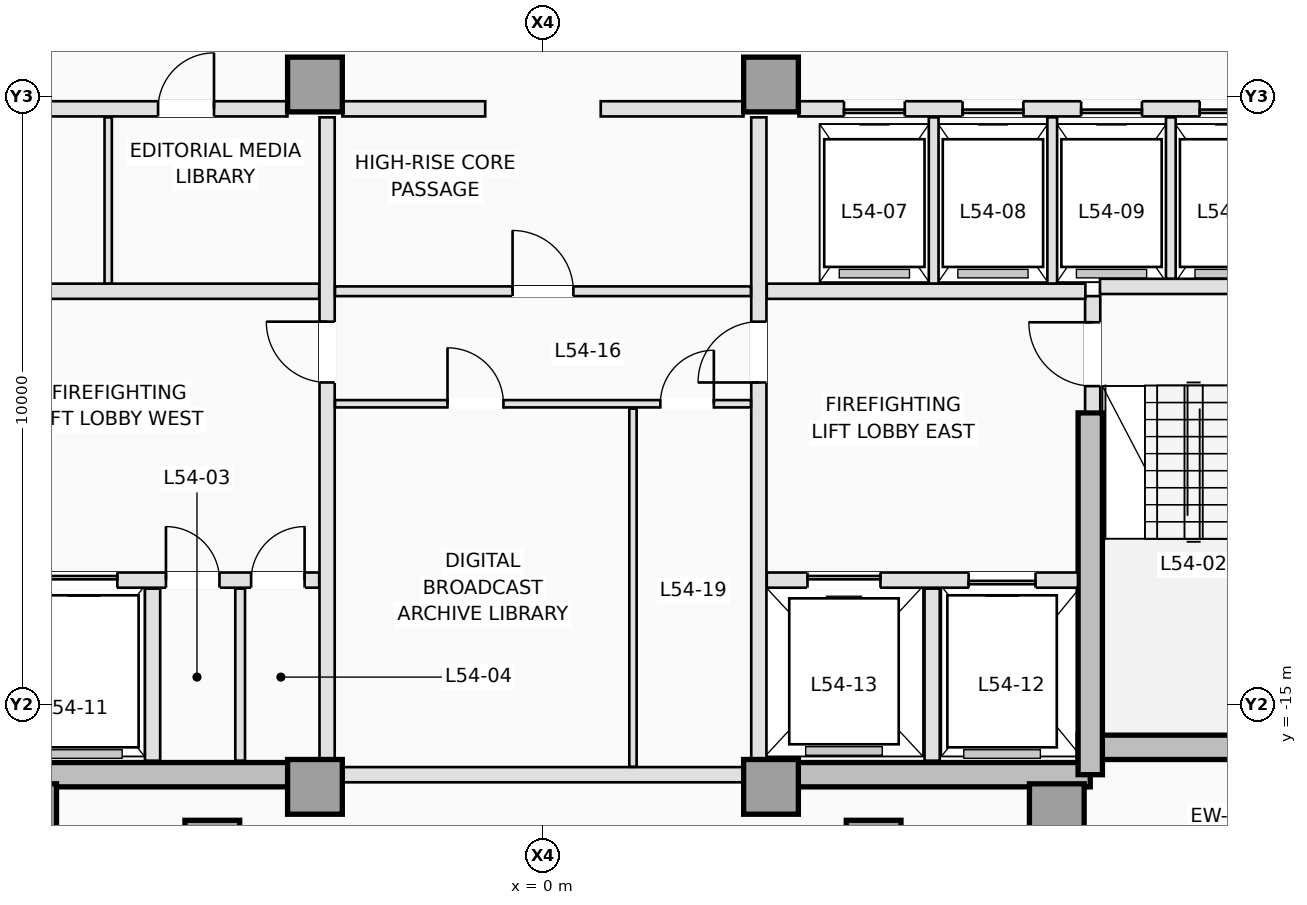
"""IFC4 building model, lengths in metres.
Left out: names, types, materials, properties, quantities, classifications, styles, units other than length and angle.
Written with IfcOpenShell. Run it as: python <this file> out.ifc"""

import sys

from ifc_helpers import new_model, si_unit, direction, frame, frame_2d, origin, origin_2d, place, context, subcontext, project, spatial, rectangle, extrude, element, fill, save


model = new_model("IFC4")
c1 = context("Model", 3, precision=1e-05, world=origin(), true_north=direction((0.0, 1.0)))
c2 = subcontext(c1, "Body", "Model", "MODEL_VIEW")
j1 = project(units=[si_unit("LENGTHUNIT", "METRE"), si_unit("PLANEANGLEUNIT", "RADIAN")], contexts=[c1])
p1 = place(None, origin())
s1 = spatial("IfcSite", under=j1, at=p1, CompositionType="ELEMENT")
p2 = place(p1, origin())
s2 = spatial("IfcBuilding", under=s1, at=p2, CompositionType="ELEMENT")
p3 = place(p2, frame((0.0, 0.0, 197.4)))
s3 = spatial("IfcBuildingStorey", under=s2, at=p3, CompositionType="ELEMENT", Elevation=197.4)
for number, where, z_axis, x_axis in (
    (1, (-9.0, -16.15, 0.0), (0.0, 0.0, 1.0), (1.0, 0.0, 0.0)),
    (2, (3.75, -16.15, 0.0), (0.0, 0.0, 1.0), (1.0, 0.0, 0.0)),
):
    element("IfcWall", number, at=place(p3, frame(where, z_axis=z_axis, x_axis=x_axis)), inside=s3, PredefinedType="SHEAR", context=c2, shape_type="SweptSolid", body=[
        extrude(rectangle(XDim=5.25, YDim=0.4, at=frame_2d((2.625, 0.0))), origin(), (0.0, 0.0, 1.0), 3.5),
    ])
p4 = place(p3, frame((8.8, -15.7, 0.0), z_axis=(0.0, 0.0, 1.0), x_axis=(1.0, 0.0, 0.0)))
e3 = element("IfcWall", 3, at=p4, inside=s3, PredefinedType="SHEAR", context=c2, shape_type="SweptSolid", body=[
    extrude(rectangle(XDim=3.8, YDim=0.4, at=frame_2d((1.9, 0.0))), origin(), (0.0, 0.0, 1.0), 3.5),
])
p5 = place(p3, frame((9.0, -16.15, 0.0), z_axis=(0.0, 0.0, 1.0), x_axis=(0.0, 1.0, 0.0)))
e4 = element("IfcWall", 4, at=p5, inside=s3, PredefinedType="SHEAR", context=c2, shape_type="SweptSolid", body=[
    extrude(rectangle(XDim=5.95, YDim=0.4, at=frame_2d((2.975, 0.0))), origin(), (0.0, 0.0, 1.0), 3.5),
])
for number, where, z_axis, x_axis in (
    (5, (-8.45, -16.75, 0.0), (0.0, 0.0, 1.0), (1.0, 0.0, 0.0)),
    (6, (-3.75, -16.35, 0.0), (0.0, 0.0, 1.0), (1.0, 0.0, 0.0)),
    (7, (3.75, -16.35, 0.0), (0.0, 0.0, 1.0), (1.0, 0.0, 0.0)),
    (8, (8.45, -16.75, 0.0), (0.0, 0.0, 1.0), (1.0, 0.0, 0.0)),
    (9, (-3.75, -4.8, 0.0), (0.0, 0.0, 1.0), (1.0, 0.0, 0.0)),
    (10, (3.75, -4.8, 0.0), (0.0, 0.0, 1.0), (1.0, 0.0, 0.0)),
    (11, (-5.438, -17.35, 0.0), (0.0, 0.0, 1.0), (0.0, 1.0, 0.0)),
    (12, (5.438, -17.35, 0.0), (0.0, 0.0, 1.0), (0.0, 1.0, 0.0)),
):
    element("IfcColumn", number, at=place(p3, frame(where, z_axis=z_axis, x_axis=x_axis)), inside=s3, PredefinedType="COLUMN", context=c2, shape_type="SweptSolid", body=[
        extrude(rectangle(XDim=0.9, YDim=0.9, at=origin_2d()), origin(), (0.0, 0.0, 1.0), 3.5),
    ])
p6 = place(p3, frame((9.04, -10.18, 0.0), z_axis=(0.0, 0.0, 1.0), x_axis=(0.0, 1.0, 0.0)))
e13 = element("IfcWall", 13, at=p6, inside=s3, PredefinedType="PARTITIONING", context=c2, shape_type="SweptSolid", body=[
    extrude(rectangle(XDim=1.9, YDim=0.25, at=frame_2d((0.95, 0.0))), origin(), (0.0, 0.0, 1.0), 3.25),
])
p7 = place(p6, frame((0.42, 0.0, 0.0)))
e14 = element("IfcOpeningElement", 14, at=p7, cuts=e13, PredefinedType="OPENING", context=c2, shape_type="SweptSolid", body=[
    extrude(rectangle(XDim=1.05, YDim=2.15, at=frame_2d((0.525, 1.075))), frame((0.0, 0.135, 0.0), z_axis=(0.0, -1.0, 0.0), x_axis=(1.0, 0.0, 0.0)), (0.0, 0.0, 1.0), 0.27),
])
p8 = place(p3, frame((9.16, -8.12, 0.0), z_axis=(0.0, 0.0, 1.0), x_axis=(1.0, 0.0, 0.0)))
e15 = element("IfcWall", 15, at=p8, inside=s3, PredefinedType="PARTITIONING", context=c2, shape_type="SweptSolid", body=[
    extrude(rectangle(XDim=3.22, YDim=0.25, at=frame_2d((1.61, 0.0))), origin(), (0.0, 0.0, 1.0), 3.25),
])
p9 = place(p3, frame((-8.798, -12.95, 0.0), z_axis=(0.0, 0.0, 1.0), x_axis=(1.0, 0.0, 0.0)))
e16 = element("IfcWall", 16, at=p9, inside=s3, PredefinedType="PARTITIONING", context=c2, shape_type="SweptSolid", body=[
    extrude(rectangle(XDim=5.118, YDim=0.25, at=frame_2d((2.559, 0.0))), origin(), (0.0, 0.0, 1.0), 3.25),
])
p10 = place(p9, frame((0.698, 0.0, 0.0)))
e17 = element("IfcOpeningElement", 17, at=p10, cuts=e16, PredefinedType="OPENING", context=c2, shape_type="SweptSolid", body=[
    extrude(rectangle(XDim=1.1, YDim=2.15, at=frame_2d((0.55, 1.075))), frame((0.0, 0.135, 0.0), z_axis=(0.0, -1.0, 0.0), x_axis=(1.0, 0.0, 0.0)), (0.0, 0.0, 1.0), 0.27),
])
p11 = place(p9, frame((2.598, 0.0, 0.0)))
e18 = element("IfcOpeningElement", 18, at=p11, cuts=e16, PredefinedType="OPENING", context=c2, shape_type="SweptSolid", body=[
    extrude(rectangle(XDim=0.88, YDim=2.1, at=frame_2d((0.44, 1.05))), frame((0.0, 0.135, 0.0), z_axis=(0.0, -1.0, 0.0), x_axis=(1.0, 0.0, 0.0)), (0.0, 0.0, 1.0), 0.27),
])
p12 = place(p9, frame((3.998, 0.0, 0.0)))
e19 = element("IfcOpeningElement", 19, at=p12, cuts=e16, PredefinedType="OPENING", context=c2, shape_type="SweptSolid", body=[
    extrude(rectangle(XDim=0.88, YDim=2.1, at=frame_2d((0.44, 1.05))), frame((0.0, 0.135, 0.0), z_axis=(0.0, -1.0, 0.0), x_axis=(1.0, 0.0, 0.0)), (0.0, 0.0, 1.0), 0.27),
])
p13 = place(p3, frame((3.68, -12.95, 0.0), z_axis=(0.0, 0.0, 1.0), x_axis=(1.0, 0.0, 0.0)))
e20 = element("IfcWall", 20, at=p13, inside=s3, PredefinedType="PARTITIONING", context=c2, shape_type="SweptSolid", body=[
    extrude(rectangle(XDim=5.118, YDim=0.25, at=frame_2d((2.559, 0.0))), origin(), (0.0, 0.0, 1.0), 3.25),
])
p14 = place(p13, frame((3.32, 0.0, 0.0)))
e21 = element("IfcOpeningElement", 21, at=p14, cuts=e20, PredefinedType="OPENING", context=c2, shape_type="SweptSolid", body=[
    extrude(rectangle(XDim=1.1, YDim=2.15, at=frame_2d((0.55, 1.075))), frame((0.0, 0.135, 0.0), z_axis=(0.0, -1.0, 0.0), x_axis=(1.0, 0.0, 0.0)), (0.0, 0.0, 1.0), 0.27),
])
p15 = place(p13, frame((0.67, 0.0, 0.0)))
e22 = element("IfcOpeningElement", 22, at=p15, cuts=e20, PredefinedType="OPENING", context=c2, shape_type="SweptSolid", body=[
    extrude(rectangle(XDim=1.2, YDim=2.15, at=frame_2d((0.6, 1.075))), frame((0.0, 0.135, 0.0), z_axis=(0.0, -1.0, 0.0), x_axis=(1.0, 0.0, 0.0)), (0.0, 0.0, 1.0), 0.27),
])
p16 = place(p3, frame((-6.42, -15.92, 0.0), z_axis=(0.0, 0.0, 1.0), x_axis=(0.0, 1.0, 0.0)))
e23 = element("IfcWall", 23, at=p16, inside=s3, PredefinedType="PARTITIONING", context=c2, shape_type="SweptSolid", body=[
    extrude(rectangle(XDim=2.83, YDim=0.25, at=frame_2d((1.415, 0.0))), origin(), (0.0, 0.0, 1.0), 3.25),
])
p17 = place(p3, frame((-4.98, -15.92, 0.0), z_axis=(0.0, 0.0, 1.0), x_axis=(0.0, 1.0, 0.0)))
e24 = element("IfcWall", 24, at=p17, inside=s3, PredefinedType="PARTITIONING", context=c2, shape_type="SweptSolid", body=[
    extrude(rectangle(XDim=2.83, YDim=0.16, at=frame_2d((1.415, 0.0))), origin(), (0.0, 0.0, 1.0), 3.25),
])
p18 = place(p3, frame((6.4, -15.92, 0.0), z_axis=(0.0, 0.0, 1.0), x_axis=(0.0, 1.0, 0.0)))
e25 = element("IfcWall", 25, at=p18, inside=s3, PredefinedType="PARTITIONING", context=c2, shape_type="SweptSolid", body=[
    extrude(rectangle(XDim=2.83, YDim=0.25, at=frame_2d((1.415, 0.0))), origin(), (0.0, 0.0, 1.0), 3.25),
])
for number, where, z_axis, x_axis in (
    (26, (-8.92, -8.2, 0.0), (0.0, 0.0, 1.0), (1.0, 0.0, 0.0)),
    (27, (3.68, -8.2, 0.0), (0.0, 0.0, 1.0), (1.0, 0.0, 0.0)),
):
    element("IfcWall", number, at=place(p3, frame(where, z_axis=z_axis, x_axis=x_axis)), inside=s3, PredefinedType="PARTITIONING", context=c2, shape_type="SweptSolid", body=[
        extrude(rectangle(XDim=5.24, YDim=0.25, at=frame_2d((2.62, 0.0))), origin(), (0.0, 0.0, 1.0), 3.25),
    ])
p19 = place(p3, frame((-3.55, -15.898, 0.0), z_axis=(0.0, 0.0, 1.0), x_axis=(0.0, 1.0, 0.0)))
e28 = element("IfcWall", 28, at=p19, inside=s3, PredefinedType="PARTITIONING", context=c2, shape_type="SweptSolid", body=[
    extrude(rectangle(XDim=10.558, YDim=0.25, at=frame_2d((5.279, 0.0))), origin(), (0.0, 0.0, 1.0), 3.25),
])
p20 = place(p19, frame((6.198, 0.0, 0.0)))
e29 = element("IfcOpeningElement", 29, at=p20, cuts=e28, PredefinedType="OPENING", context=c2, shape_type="SweptSolid", body=[
    extrude(rectangle(XDim=1.0, YDim=2.15, at=frame_2d((0.5, 1.075))), frame((0.0, 0.135, 0.0), z_axis=(0.0, -1.0, 0.0), x_axis=(1.0, 0.0, 0.0)), (0.0, 0.0, 1.0), 0.27),
])
p21 = place(p3, frame((3.55, -15.898, 0.0), z_axis=(0.0, 0.0, 1.0), x_axis=(0.0, 1.0, 0.0)))
e30 = element("IfcWall", 30, at=p21, inside=s3, PredefinedType="PARTITIONING", context=c2, shape_type="SweptSolid", body=[
    extrude(rectangle(XDim=10.558, YDim=0.25, at=frame_2d((5.279, 0.0))), origin(), (0.0, 0.0, 1.0), 3.25),
])
p22 = place(p21, frame((6.198, 0.0, 0.0)))
e31 = element("IfcOpeningElement", 31, at=p22, cuts=e30, PredefinedType="OPENING", context=c2, shape_type="SweptSolid", body=[
    extrude(rectangle(XDim=1.0, YDim=2.15, at=frame_2d((0.5, 1.075))), frame((0.0, 0.135, 0.0), z_axis=(0.0, -1.0, 0.0), x_axis=(1.0, 0.0, 0.0)), (0.0, 0.0, 1.0), 0.27),
])
p23 = place(p3, frame((-12.48, -5.2, 0.0), z_axis=(0.0, 0.0, 1.0), x_axis=(1.0, 0.0, 0.0)))
e32 = element("IfcWall", 32, at=p23, inside=s3, PredefinedType="PARTITIONING", context=c2, shape_type="SweptSolid", body=[
    extrude(rectangle(XDim=8.278, YDim=0.25, at=frame_2d((4.139, 0.0))), origin(), (0.0, 0.0, 1.0), 3.25),
])
p24 = place(p23, frame((3.05, 0.0, 0.0)))
e33 = element("IfcOpeningElement", 33, at=p24, cuts=e32, PredefinedType="OPENING", context=c2, shape_type="SweptSolid", body=[
    extrude(rectangle(XDim=0.92, YDim=2.12, at=frame_2d((0.46, 1.06))), frame((0.0, 0.135, 0.0), z_axis=(0.0, -1.0, 0.0), x_axis=(1.0, 0.0, 0.0)), (0.0, 0.0, 1.0), 0.27),
])
p25 = place(p23, frame((6.15, 0.0, 0.0)))
e34 = element("IfcOpeningElement", 34, at=p25, cuts=e32, PredefinedType="OPENING", context=c2, shape_type="SweptSolid", body=[
    extrude(rectangle(XDim=0.92, YDim=2.12, at=frame_2d((0.46, 1.06))), frame((0.0, 0.135, 0.0), z_axis=(0.0, -1.0, 0.0), x_axis=(1.0, 0.0, 0.0)), (0.0, 0.0, 1.0), 0.27),
])
p26 = place(p3, frame((4.202, -5.2, 0.0), z_axis=(0.0, 0.0, 1.0), x_axis=(1.0, 0.0, 0.0)))
e35 = element("IfcWall", 35, at=p26, inside=s3, PredefinedType="PARTITIONING", context=c2, shape_type="SweptSolid", body=[
    extrude(rectangle(XDim=8.278, YDim=0.25, at=frame_2d((4.139, 0.0))), origin(), (0.0, 0.0, 1.0), 3.25),
])
p27 = place(p26, frame((0.748, 0.0, 0.0)))
e36 = element("IfcOpeningElement", 36, at=p27, cuts=e35, PredefinedType="OPENING", context=c2, shape_type="SweptSolid", body=[
    extrude(rectangle(XDim=1.0, YDim=2.15, at=frame_2d((0.5, 1.075))), frame((0.0, 0.135, 0.0), z_axis=(0.0, -1.0, 0.0), x_axis=(1.0, 0.0, 0.0)), (0.0, 0.0, 1.0), 0.27),
])
p28 = place(p26, frame((2.698, 0.0, 0.0)))
e37 = element("IfcOpeningElement", 37, at=p28, cuts=e35, PredefinedType="OPENING", context=c2, shape_type="SweptSolid", body=[
    extrude(rectangle(XDim=1.0, YDim=2.15, at=frame_2d((0.5, 1.075))), frame((0.0, 0.135, 0.0), z_axis=(0.0, -1.0, 0.0), x_axis=(1.0, 0.0, 0.0)), (0.0, 0.0, 1.0), 0.27),
])
p29 = place(p26, frame((4.648, 0.0, 0.0)))
e38 = element("IfcOpeningElement", 38, at=p29, cuts=e35, PredefinedType="OPENING", context=c2, shape_type="SweptSolid", body=[
    extrude(rectangle(XDim=1.0, YDim=2.15, at=frame_2d((0.5, 1.075))), frame((0.0, 0.135, 0.0), z_axis=(0.0, -1.0, 0.0), x_axis=(1.0, 0.0, 0.0)), (0.0, 0.0, 1.0), 0.27),
])
p30 = place(p26, frame((6.598, 0.0, 0.0)))
e39 = element("IfcOpeningElement", 39, at=p30, cuts=e35, PredefinedType="OPENING", context=c2, shape_type="SweptSolid", body=[
    extrude(rectangle(XDim=1.0, YDim=2.15, at=frame_2d((0.5, 1.075))), frame((0.0, 0.135, 0.0), z_axis=(0.0, -1.0, 0.0), x_axis=(1.0, 0.0, 0.0)), (0.0, 0.0, 1.0), 0.27),
])
for number, where, z_axis, x_axis in (
    (40, (-3.298, -5.2, 0.0), (0.0, 0.0, 1.0), (1.0, 0.0, 0.0)),
    (41, (0.95, -5.2, 0.0), (0.0, 0.0, 1.0), (1.0, 0.0, 0.0)),
):
    element("IfcWall", number, at=place(p3, frame(where, z_axis=z_axis, x_axis=x_axis)), inside=s3, PredefinedType="PARTITIONING", context=c2, shape_type="SweptSolid", body=[
        extrude(rectangle(XDim=2.348, YDim=0.25, at=frame_2d((1.174, 0.0))), origin(), (0.0, 0.0, 1.0), 3.25),
    ])
p31 = place(p3, frame((-7.15, -8.073, 0.0), z_axis=(0.0, 0.0, 1.0), x_axis=(0.0, 1.0, 0.0)))
e42 = element("IfcWall", 42, at=p31, inside=s3, PredefinedType="PARTITIONING", context=c2, shape_type="SweptSolid", body=[
    extrude(rectangle(XDim=2.733, YDim=0.12, at=frame_2d((1.366, 0.0))), origin(), (0.0, 0.0, 1.0), 3.25),
])
for number, where, z_axis, x_axis in (
    (43, (6.425, -8.073, 0.0), (0.0, 0.0, 1.0), (0.0, 1.0, 0.0)),
    (44, (8.375, -8.073, 0.0), (0.0, 0.0, 1.0), (0.0, 1.0, 0.0)),
):
    element("IfcWall", number, at=place(p3, frame(where, z_axis=z_axis, x_axis=x_axis)), inside=s3, PredefinedType="PARTITIONING", context=c2, shape_type="SweptSolid", body=[
        extrude(rectangle(XDim=2.733, YDim=0.16, at=frame_2d((1.366, 0.0))), origin(), (0.0, 0.0, 1.0), 3.25),
    ])
p32 = place(p3, frame((10.325, -7.993, 0.0), z_axis=(0.0, 0.0, 1.0), x_axis=(0.0, 1.0, 0.0)))
e45 = element("IfcWall", 45, at=p32, inside=s3, PredefinedType="PARTITIONING", context=c2, shape_type="SweptSolid", body=[
    extrude(rectangle(XDim=2.653, YDim=0.16, at=frame_2d((1.326, 0.0))), origin(), (0.0, 0.0, 1.0), 3.25),
])
p33 = place(p3, frame((-3.298, -16.15, 0.0), z_axis=(0.0, 0.0, 1.0), x_axis=(1.0, 0.0, 0.0)))
e46 = element("IfcWall", 46, at=p33, inside=s3, PredefinedType="PARTITIONING", context=c2, shape_type="SweptSolid", body=[
    extrude(rectangle(XDim=6.596, YDim=0.25, at=frame_2d((3.298, 0.0))), origin(), (0.0, 0.0, 1.0), 2.45),
])
p34 = place(p3, frame((-3.42, -8.2, 0.0), z_axis=(0.0, 0.0, 1.0), x_axis=(1.0, 0.0, 0.0)))
e47 = element("IfcWall", 47, at=p34, inside=s3, PredefinedType="PARTITIONING", context=c2, shape_type="SweptSolid", body=[
    extrude(rectangle(XDim=6.84, YDim=0.16, at=frame_2d((3.42, 0.0))), origin(), (0.0, 0.0, 1.0), 3.25),
])
p35 = place(p34, frame((2.92, 0.0, 0.0)))
e48 = element("IfcOpeningElement", 48, at=p35, cuts=e47, PredefinedType="OPENING", context=c2, shape_type="SweptSolid", body=[
    extrude(rectangle(XDim=1.0, YDim=2.15, at=frame_2d((0.5, 1.075))), frame((0.0, 0.09, 0.0), z_axis=(0.0, -1.0, 0.0), x_axis=(1.0, 0.0, 0.0)), (0.0, 0.0, 1.0), 0.18),
])
p36 = place(p3, frame((-3.42, -10.05, 0.0), z_axis=(0.0, 0.0, 1.0), x_axis=(1.0, 0.0, 0.0)))
e49 = element("IfcWall", 49, at=p36, inside=s3, PredefinedType="PARTITIONING", context=c2, shape_type="SweptSolid", body=[
    extrude(rectangle(XDim=6.84, YDim=0.12, at=frame_2d((3.42, 0.0))), origin(), (0.0, 0.0, 1.0), 3.25),
])
p37 = place(p36, frame((1.85, 0.0, 0.0)))
e50 = element("IfcOpeningElement", 50, at=p37, cuts=e49, PredefinedType="OPENING", context=c2, shape_type="SweptSolid", body=[
    extrude(rectangle(XDim=0.92, YDim=2.12, at=frame_2d((0.46, 1.06))), frame((0.0, 0.07, 0.0), z_axis=(0.0, -1.0, 0.0), x_axis=(1.0, 0.0, 0.0)), (0.0, 0.0, 1.0), 0.14),
])
p38 = place(p36, frame((5.35, 0.0, 0.0)))
e51 = element("IfcOpeningElement", 51, at=p38, cuts=e49, PredefinedType="OPENING", context=c2, shape_type="SweptSolid", body=[
    extrude(rectangle(XDim=0.88, YDim=2.12, at=frame_2d((0.44, 1.06))), frame((0.0, 0.07, 0.0), z_axis=(0.0, -1.0, 0.0), x_axis=(1.0, 0.0, 0.0)), (0.0, 0.0, 1.0), 0.14),
])
p39 = place(p3, frame((1.48, -16.02, 0.0), z_axis=(0.0, 0.0, 1.0), x_axis=(0.0, 1.0, 0.0)))
e52 = element("IfcWall", 52, at=p39, inside=s3, PredefinedType="PARTITIONING", context=c2, shape_type="SweptSolid", body=[
    extrude(rectangle(XDim=5.89, YDim=0.12, at=frame_2d((2.945, 0.0))), origin(), (0.0, 0.0, 1.0), 3.25),
])
p40 = place(p27, origin())
e53 = element("IfcDoor", 53, at=p40, inside=s3, OperationType="SLIDING_TO_RIGHT", PredefinedType="DOOR", context=c2, shape_type="SweptSolid", body=[
    extrude(rectangle(XDim=1.0, YDim=2.15, at=frame_2d((0.5, 1.075))), frame((0.0, 0.025, 0.0), z_axis=(0.0, -1.0, 0.0), x_axis=(1.0, 0.0, 0.0)), (0.0, 0.0, 1.0), 0.05),
])
fill(e36, e53)
p41 = place(p28, origin())
e54 = element("IfcDoor", 54, at=p41, inside=s3, OperationType="SLIDING_TO_RIGHT", PredefinedType="DOOR", context=c2, shape_type="SweptSolid", body=[
    extrude(rectangle(XDim=1.0, YDim=2.15, at=frame_2d((0.5, 1.075))), frame((0.0, 0.025, 0.0), z_axis=(0.0, -1.0, 0.0), x_axis=(1.0, 0.0, 0.0)), (0.0, 0.0, 1.0), 0.05),
])
fill(e37, e54)
p42 = place(p29, origin())
e55 = element("IfcDoor", 55, at=p42, inside=s3, OperationType="SLIDING_TO_RIGHT", PredefinedType="DOOR", context=c2, shape_type="SweptSolid", body=[
    extrude(rectangle(XDim=1.0, YDim=2.15, at=frame_2d((0.5, 1.075))), frame((0.0, 0.025, 0.0), z_axis=(0.0, -1.0, 0.0), x_axis=(1.0, 0.0, 0.0)), (0.0, 0.0, 1.0), 0.05),
])
fill(e38, e55)
p43 = place(p30, origin())
e56 = element("IfcDoor", 56, at=p43, inside=s3, OperationType="SLIDING_TO_RIGHT", PredefinedType="DOOR", context=c2, shape_type="SweptSolid", body=[
    extrude(rectangle(XDim=1.0, YDim=2.15, at=frame_2d((0.5, 1.075))), frame((0.0, 0.025, 0.0), z_axis=(0.0, -1.0, 0.0), x_axis=(1.0, 0.0, 0.0)), (0.0, 0.0, 1.0), 0.05),
])
fill(e39, e56)
p44 = place(p10, origin())
e57 = element("IfcDoor", 57, at=p44, inside=s3, OperationType="SLIDING_TO_LEFT", PredefinedType="DOOR", context=c2, shape_type="SweptSolid", body=[
    extrude(rectangle(XDim=1.1, YDim=2.15, at=frame_2d((0.55, 1.075))), frame((0.0, 0.025, 0.0), z_axis=(0.0, -1.0, 0.0), x_axis=(1.0, 0.0, 0.0)), (0.0, 0.0, 1.0), 0.05),
])
fill(e17, e57)
p45 = place(p14, origin())
e58 = element("IfcDoor", 58, at=p45, inside=s3, OperationType="SLIDING_TO_RIGHT", PredefinedType="DOOR", context=c2, shape_type="SweptSolid", body=[
    extrude(rectangle(XDim=1.1, YDim=2.15, at=frame_2d((0.55, 1.075))), frame((0.0, 0.025, 0.0), z_axis=(0.0, -1.0, 0.0), x_axis=(1.0, 0.0, 0.0)), (0.0, 0.0, 1.0), 0.05),
])
fill(e21, e58)
p46 = place(p15, origin())
e59 = element("IfcDoor", 59, at=p46, inside=s3, OperationType="SLIDING_TO_LEFT", PredefinedType="DOOR", context=c2, shape_type="SweptSolid", body=[
    extrude(rectangle(XDim=1.2, YDim=2.15, at=frame_2d((0.6, 1.075))), frame((0.0, 0.025, 0.0), z_axis=(0.0, -1.0, 0.0), x_axis=(1.0, 0.0, 0.0)), (0.0, 0.0, 1.0), 0.05),
])
fill(e22, e59)
p47 = place(p7, origin())
e60 = element("IfcDoor", 60, at=p47, inside=s3, OperationType="SINGLE_SWING_RIGHT", PredefinedType="DOOR", context=c2, shape_type="SweptSolid", body=[
    extrude(rectangle(XDim=1.05, YDim=2.15, at=frame_2d((0.525, 1.075))), frame((0.0, 0.025, 0.0), z_axis=(0.0, -1.0, 0.0), x_axis=(1.0, 0.0, 0.0)), (0.0, 0.0, 1.0), 0.05),
])
fill(e14, e60)
p48 = place(p11, origin())
e61 = element("IfcDoor", 61, at=p48, inside=s3, OperationType="SINGLE_SWING_LEFT", PredefinedType="TRAPDOOR", context=c2, shape_type="SweptSolid", body=[
    extrude(rectangle(XDim=0.88, YDim=2.1, at=frame_2d((0.44, 1.05))), frame((0.0, 0.025, 0.0), z_axis=(0.0, -1.0, 0.0), x_axis=(1.0, 0.0, 0.0)), (0.0, 0.0, 1.0), 0.05),
])
fill(e18, e61)
p49 = place(p12, origin())
e62 = element("IfcDoor", 62, at=p49, inside=s3, OperationType="SINGLE_SWING_RIGHT", PredefinedType="TRAPDOOR", context=c2, shape_type="SweptSolid", body=[
    extrude(rectangle(XDim=0.88, YDim=2.1, at=frame_2d((0.44, 1.05))), frame((0.0, 0.025, 0.0), z_axis=(0.0, -1.0, 0.0), x_axis=(1.0, 0.0, 0.0)), (0.0, 0.0, 1.0), 0.05),
])
fill(e19, e62)
p50 = place(p20, origin())
e63 = element("IfcDoor", 63, at=p50, inside=s3, OperationType="SINGLE_SWING_RIGHT", PredefinedType="DOOR", context=c2, shape_type="SweptSolid", body=[
    extrude(rectangle(XDim=1.0, YDim=2.15, at=frame_2d((0.5, 1.075))), frame((0.0, 0.025, 0.0), z_axis=(0.0, -1.0, 0.0), x_axis=(1.0, 0.0, 0.0)), (0.0, 0.0, 1.0), 0.05),
])
fill(e29, e63)
p51 = place(p22, origin())
e64 = element("IfcDoor", 64, at=p51, inside=s3, OperationType="SINGLE_SWING_LEFT", PredefinedType="DOOR", context=c2, shape_type="SweptSolid", body=[
    extrude(rectangle(XDim=1.0, YDim=2.15, at=frame_2d((0.5, 1.075))), frame((0.0, 0.025, 0.0), z_axis=(0.0, -1.0, 0.0), x_axis=(1.0, 0.0, 0.0)), (0.0, 0.0, 1.0), 0.05),
])
fill(e31, e64)
p52 = place(p25, origin())
e65 = element("IfcDoor", 65, at=p52, inside=s3, OperationType="SINGLE_SWING_RIGHT", PredefinedType="DOOR", context=c2, shape_type="SweptSolid", body=[
    extrude(rectangle(XDim=0.92, YDim=2.12, at=frame_2d((0.46, 1.06))), frame((0.0, 0.025, 0.0), z_axis=(0.0, -1.0, 0.0), x_axis=(1.0, 0.0, 0.0)), (0.0, 0.0, 1.0), 0.05),
])
fill(e34, e65)
p53 = place(p35, origin())
e66 = element("IfcDoor", 66, at=p53, inside=s3, OperationType="SINGLE_SWING_LEFT", PredefinedType="DOOR", context=c2, shape_type="SweptSolid", body=[
    extrude(rectangle(XDim=1.0, YDim=2.15, at=frame_2d((0.5, 1.075))), frame((0.0, 0.025, 0.0), z_axis=(0.0, -1.0, 0.0), x_axis=(1.0, 0.0, 0.0)), (0.0, 0.0, 1.0), 0.05),
])
fill(e48, e66)
p54 = place(p37, origin())
e67 = element("IfcDoor", 67, at=p54, inside=s3, OperationType="SINGLE_SWING_LEFT", PredefinedType="DOOR", context=c2, shape_type="SweptSolid", body=[
    extrude(rectangle(XDim=0.92, YDim=2.12, at=frame_2d((0.46, 1.06))), frame((0.0, 0.025, 0.0), z_axis=(0.0, -1.0, 0.0), x_axis=(1.0, 0.0, 0.0)), (0.0, 0.0, 1.0), 0.05),
])
fill(e50, e67)
p55 = place(p38, origin())
e68 = element("IfcDoor", 68, at=p55, inside=s3, OperationType="SINGLE_SWING_RIGHT", PredefinedType="DOOR", context=c2, shape_type="SweptSolid", body=[
    extrude(rectangle(XDim=0.88, YDim=2.12, at=frame_2d((0.44, 1.06))), frame((0.0, 0.025, 0.0), z_axis=(0.0, -1.0, 0.0), x_axis=(1.0, 0.0, 0.0)), (0.0, 0.0, 1.0), 0.05),
])
fill(e51, e68)
save(model, sys.argv[1])
